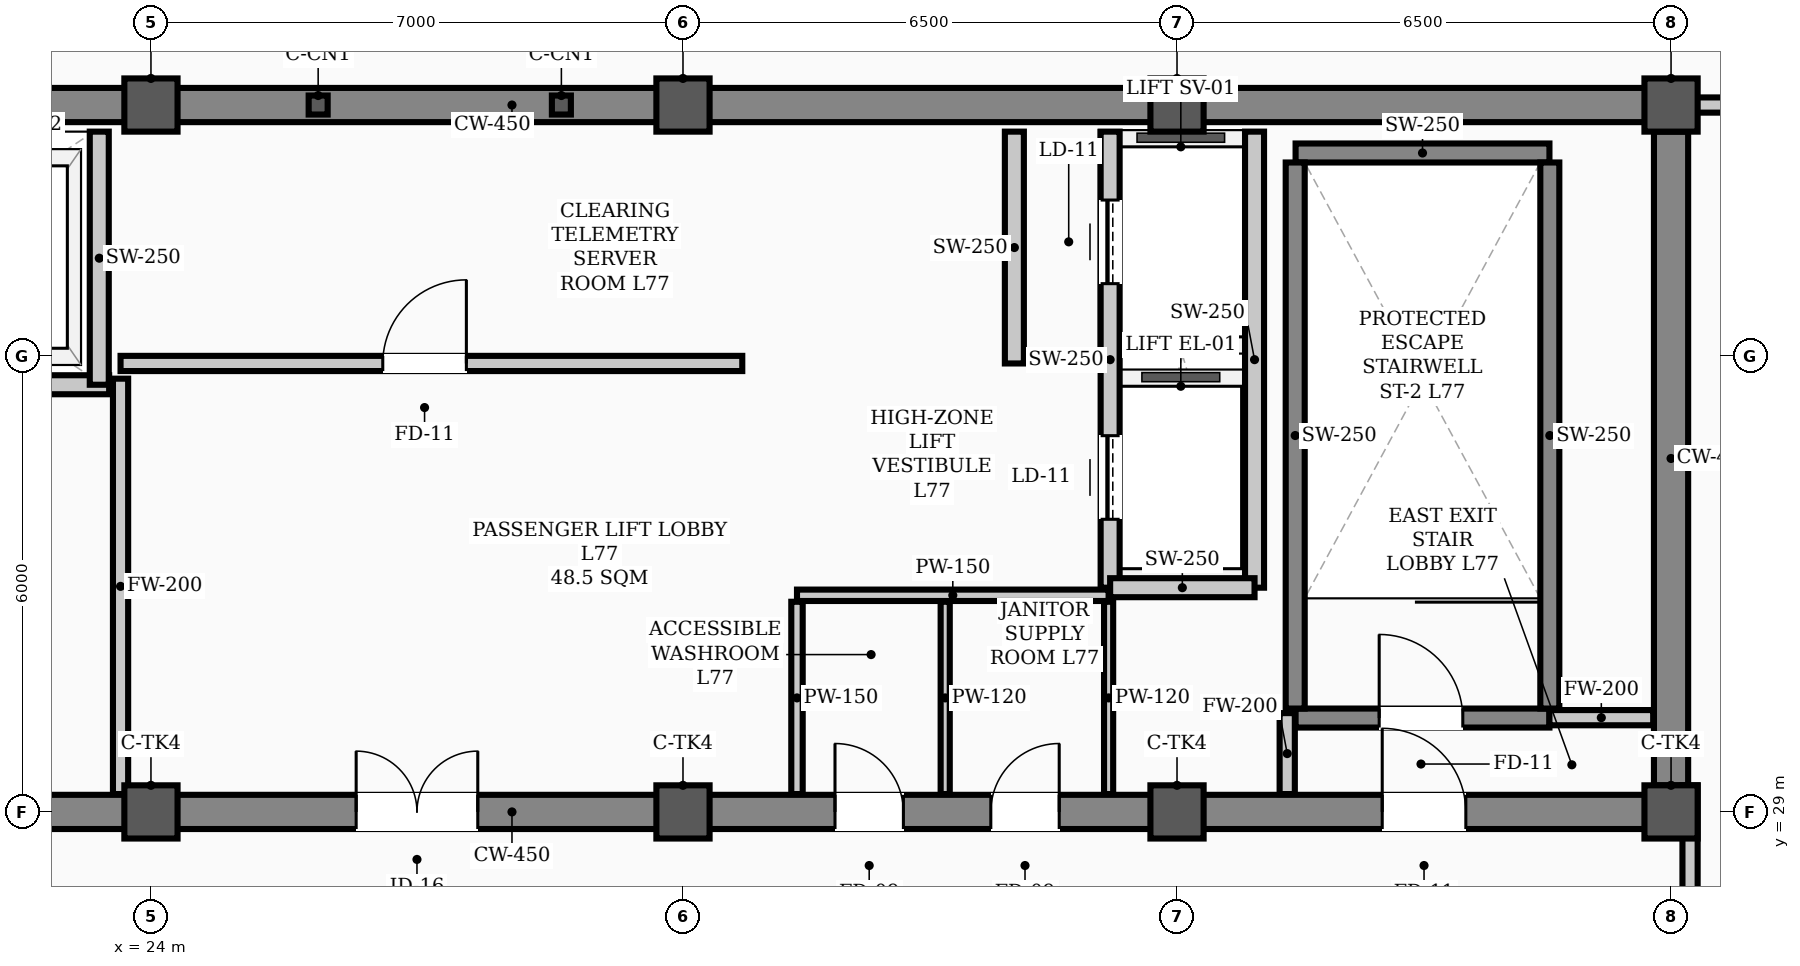
"""IFC4 building model, lengths in metres.
Left out: names, types, materials, properties, quantities, classifications, styles, units other than length and angle.
Written with IfcOpenShell. Run it as: python <this file> out.ifc"""

import sys

from ifc_helpers import new_model, si_unit, direction, frame, frame_2d, origin, origin_2d, place, context, subcontext, project, spatial, rectangle, hollow_rectangle, extrude, element, fill, save


model = new_model("IFC4")
c1 = context("Model", 3, precision=1e-05, world=origin(), true_north=direction((0.0, 1.0)))
c2 = subcontext(c1, "Body", "Model", "MODEL_VIEW")
j1 = project(units=[si_unit("LENGTHUNIT", "METRE"), si_unit("PLANEANGLEUNIT", "RADIAN")], contexts=[c1])
p1 = place(None, origin())
s1 = spatial("IfcSite", under=j1, at=p1, CompositionType="ELEMENT")
p2 = place(p1, origin())
s2 = spatial("IfcBuilding", under=s1, at=p2, CompositionType="ELEMENT")
p3 = place(p2, frame((0.0, 0.0, 312.6)))
s3 = spatial("IfcBuildingStorey", under=s2, at=p3, CompositionType="ELEMENT", Elevation=312.6)
for number, where, z_axis, x_axis in (
    (1, (24.0, 29.0, 0.0), (0.0, 0.0, 1.0), (1.0, 0.0, 0.0)),
    (2, (24.0, 38.3, 0.0), (0.0, 0.0, 1.0), (1.0, 0.0, 0.0)),
    (3, (31.0, 29.0, 0.0), (0.0, 0.0, 1.0), (1.0, 0.0, 0.0)),
    (4, (31.0, 38.3, 0.0), (0.0, 0.0, 1.0), (1.0, 0.0, 0.0)),
    (5, (37.5, 29.0, 0.0), (0.0, 0.0, 1.0), (1.0, 0.0, 0.0)),
    (6, (37.5, 38.3, 0.0), (0.0, 0.0, 1.0), (1.0, 0.0, 0.0)),
    (7, (44.0, 29.0, 0.0), (0.0, 0.0, 1.0), (1.0, 0.0, 0.0)),
    (8, (44.0, 38.3, 0.0), (0.0, 0.0, 1.0), (1.0, 0.0, 0.0)),
):
    element("IfcColumn", number, at=place(p3, frame(where, z_axis=z_axis, x_axis=x_axis)), inside=s3, PredefinedType="COLUMN", context=c2, shape_type="SweptSolid", body=[
        extrude(hollow_rectangle(XDim=0.7, YDim=0.7, WallThickness=0.028, InnerFilletRadius=0.014, OuterFilletRadius=0.042, at=origin_2d()), origin(), (0.0, 0.0, 1.0), 4.8),
    ])
for number, where, z_axis, x_axis in (
    (9, (26.2, 38.3, 0.0), (0.0, 0.0, 1.0), (1.0, 0.0, 0.0)),
    (10, (29.4, 38.3, 0.0), (0.0, 0.0, 1.0), (1.0, 0.0, 0.0)),
):
    element("IfcColumn", number, at=place(p3, frame(where, z_axis=z_axis, x_axis=x_axis)), inside=s3, PredefinedType="COLUMN", context=c2, shape_type="SweptSolid", body=[
        extrude(hollow_rectangle(XDim=0.25, YDim=0.25, WallThickness=0.01, InnerFilletRadius=0.01, OuterFilletRadius=0.02, at=origin_2d()), origin(), (0.0, 0.0, 1.0), 3.1),
    ])
p4 = place(p3, frame((13.5, 29.0, 0.0), z_axis=(0.0, 0.0, 1.0), x_axis=(1.0, 0.0, 0.0)))
e11 = element("IfcWall", 11, at=p4, inside=s3, PredefinedType="SHEAR", context=c2, shape_type="SweptSolid", body=[
    extrude(rectangle(XDim=30.5, YDim=0.45, at=frame_2d((15.25, 0.0))), origin(), (0.0, 0.0, 1.0), 4.45),
])
p5 = place(p4, frame((1.75, 0.0, 0.0)))
e12 = element("IfcOpeningElement", 12, at=p5, cuts=e11, PredefinedType="OPENING", context=c2, shape_type="SweptSolid", body=[
    extrude(rectangle(XDim=1.1, YDim=2.08, at=frame_2d((0.55, 1.04))), frame((0.0, 0.235, 0.0), z_axis=(0.0, -1.0, 0.0), x_axis=(1.0, 0.0, 0.0)), (0.0, 0.0, 1.0), 0.47),
])
p6 = place(p4, frame((26.7, 0.0, 0.0)))
e13 = element("IfcOpeningElement", 13, at=p6, cuts=e11, PredefinedType="OPENING", context=c2, shape_type="SweptSolid", body=[
    extrude(rectangle(XDim=1.1, YDim=2.08, at=frame_2d((0.55, 1.04))), frame((0.0, 0.235, 0.0), z_axis=(0.0, -1.0, 0.0), x_axis=(1.0, 0.0, 0.0)), (0.0, 0.0, 1.0), 0.47),
])
p7 = place(p4, frame((6.8, 0.0, 0.0)))
e14 = element("IfcOpeningElement", 14, at=p7, cuts=e11, PredefinedType="OPENING", context=c2, shape_type="SweptSolid", body=[
    extrude(rectangle(XDim=1.1, YDim=2.08, at=frame_2d((0.55, 1.04))), frame((0.0, 0.235, 0.0), z_axis=(0.0, -1.0, 0.0), x_axis=(1.0, 0.0, 0.0)), (0.0, 0.0, 1.0), 0.47),
])
p8 = place(p4, frame((13.2, 0.0, 0.0)))
e15 = element("IfcOpeningElement", 15, at=p8, cuts=e11, PredefinedType="OPENING", context=c2, shape_type="SweptSolid", body=[
    extrude(rectangle(XDim=1.6, YDim=2.08, at=frame_2d((0.8, 1.04))), frame((0.0, 0.235, 0.0), z_axis=(0.0, -1.0, 0.0), x_axis=(1.0, 0.0, 0.0)), (0.0, 0.0, 1.0), 0.47),
])
p9 = place(p4, frame((19.5, 0.0, 0.0)))
e16 = element("IfcOpeningElement", 16, at=p9, cuts=e11, PredefinedType="OPENING", context=c2, shape_type="SweptSolid", body=[
    extrude(rectangle(XDim=0.9, YDim=2.08, at=frame_2d((0.45, 1.04))), frame((0.0, 0.235, 0.0), z_axis=(0.0, -1.0, 0.0), x_axis=(1.0, 0.0, 0.0)), (0.0, 0.0, 1.0), 0.47),
])
p10 = place(p4, frame((21.55, 0.0, 0.0)))
e17 = element("IfcOpeningElement", 17, at=p10, cuts=e11, PredefinedType="OPENING", context=c2, shape_type="SweptSolid", body=[
    extrude(rectangle(XDim=0.9, YDim=2.08, at=frame_2d((0.45, 1.04))), frame((0.0, 0.235, 0.0), z_axis=(0.0, -1.0, 0.0), x_axis=(1.0, 0.0, 0.0)), (0.0, 0.0, 1.0), 0.47),
])
p11 = place(p3, frame((13.5, 38.3, 0.0), z_axis=(0.0, 0.0, 1.0), x_axis=(1.0, 0.0, 0.0)))
e18 = element("IfcWall", 18, at=p11, inside=s3, PredefinedType="SHEAR", context=c2, shape_type="SweptSolid", body=[
    extrude(rectangle(XDim=30.5, YDim=0.45, at=frame_2d((15.25, 0.0))), origin(), (0.0, 0.0, 1.0), 4.45),
])
p12 = place(p3, frame((44.0, 29.35, 0.0), z_axis=(0.0, 0.0, 1.0), x_axis=(0.0, 1.0, 0.0)))
e19 = element("IfcWall", 19, at=p12, inside=s3, PredefinedType="SHEAR", context=c2, shape_type="SweptSolid", body=[
    extrude(rectangle(XDim=8.6, YDim=0.45, at=frame_2d((4.3, 0.0))), origin(), (0.0, 0.0, 1.0), 4.45),
])
p13 = place(p3, frame((39.06, 30.235, 0.0), z_axis=(0.0, 0.0, 1.0), x_axis=(1.0, 0.0, 0.0)))
e20 = element("IfcWall", 20, at=p13, inside=s3, PredefinedType="STANDARD", context=c2, shape_type="SweptSolid", body=[
    extrude(rectangle(XDim=3.34, YDim=0.25, at=frame_2d((1.67, 0.0))), origin(), (0.0, 0.0, 1.0), 4.45),
])
p14 = place(p13, frame((1.1, 0.0, 0.0)))
e21 = element("IfcOpeningElement", 21, at=p14, cuts=e20, PredefinedType="OPENING", context=c2, shape_type="SweptSolid", body=[
    extrude(rectangle(XDim=1.1, YDim=2.08, at=frame_2d((0.55, 1.04))), frame((0.0, 0.135, 0.0), z_axis=(0.0, -1.0, 0.0), x_axis=(1.0, 0.0, 0.0)), (0.0, 0.0, 1.0), 0.27),
])
p15 = place(p3, frame((39.06, 37.669, 0.0), z_axis=(0.0, 0.0, 1.0), x_axis=(1.0, 0.0, 0.0)))
e22 = element("IfcWall", 22, at=p15, inside=s3, PredefinedType="STANDARD", context=c2, shape_type="SweptSolid", body=[
    extrude(rectangle(XDim=3.34, YDim=0.25, at=frame_2d((1.67, 0.0))), origin(), (0.0, 0.0, 1.0), 4.45),
])
for number, where, z_axis, x_axis in (
    (23, (39.055, 30.36, 0.0), (0.0, 0.0, 1.0), (0.0, 1.0, 0.0)),
    (24, (42.405, 30.36, 0.0), (0.0, 0.0, 1.0), (0.0, 1.0, 0.0)),
):
    element("IfcWall", number, at=place(p3, frame(where, z_axis=z_axis, x_axis=x_axis)), inside=s3, PredefinedType="STANDARD", context=c2, shape_type="SweptSolid", body=[
        extrude(rectangle(XDim=7.184, YDim=0.25, at=frame_2d((3.592, 0.0))), origin(), (0.0, 0.0, 1.0), 4.45),
    ])
p16 = place(p3, frame((18.1, 34.62, 0.0), z_axis=(0.0, 0.0, 1.0), x_axis=(1.0, 0.0, 0.0)))
e25 = element("IfcWall", 25, at=p16, inside=s3, PredefinedType="STANDARD", context=c2, shape_type="SweptSolid", body=[
    extrude(rectangle(XDim=5.35, YDim=0.25, at=frame_2d((2.675, 0.0))), origin(), (0.0, 0.0, 1.0), 4.45),
])
p17 = place(p16, frame((0.85, 0.0, 0.0)))
e26 = element("IfcOpeningElement", 26, at=p17, cuts=e25, PredefinedType="OPENING", context=c2, shape_type="SweptSolid", body=[
    extrude(rectangle(XDim=1.1, YDim=2.08, at=frame_2d((0.55, 1.04))), frame((0.0, 0.135, 0.0), z_axis=(0.0, -1.0, 0.0), x_axis=(1.0, 0.0, 0.0)), (0.0, 0.0, 1.0), 0.27),
])
p18 = place(p16, frame((3.45, 0.0, 0.0)))
e27 = element("IfcOpeningElement", 27, at=p18, cuts=e25, PredefinedType="OPENING", context=c2, shape_type="SweptSolid", body=[
    extrude(rectangle(XDim=1.1, YDim=2.08, at=frame_2d((0.55, 1.04))), frame((0.0, 0.135, 0.0), z_axis=(0.0, -1.0, 0.0), x_axis=(1.0, 0.0, 0.0)), (0.0, 0.0, 1.0), 0.27),
])
p19 = place(p3, frame((36.62, 31.95, 0.0), z_axis=(0.0, 0.0, 1.0), x_axis=(0.0, 1.0, 0.0)))
e28 = element("IfcWall", 28, at=p19, inside=s3, PredefinedType="STANDARD", context=c2, shape_type="SweptSolid", body=[
    extrude(rectangle(XDim=6.0, YDim=0.25, at=frame_2d((3.0, 0.0))), origin(), (0.0, 0.0, 1.0), 4.45),
])
p20 = place(p19, frame((0.9, 0.0, 0.0)))
e29 = element("IfcOpeningElement", 29, at=p20, cuts=e28, PredefinedType="OPENING", context=c2, shape_type="SweptSolid", body=[
    extrude(rectangle(XDim=1.1, YDim=2.08, at=frame_2d((0.55, 1.04))), frame((0.0, 0.135, 0.0), z_axis=(0.0, -1.0, 0.0), x_axis=(1.0, 0.0, 0.0)), (0.0, 0.0, 1.0), 0.27),
])
p21 = place(p19, frame((4.0, 0.0, 0.0)))
e30 = element("IfcOpeningElement", 30, at=p21, cuts=e28, PredefinedType="OPENING", context=c2, shape_type="SweptSolid", body=[
    extrude(rectangle(XDim=1.1, YDim=2.08, at=frame_2d((0.55, 1.04))), frame((0.0, 0.135, 0.0), z_axis=(0.0, -1.0, 0.0), x_axis=(1.0, 0.0, 0.0)), (0.0, 0.0, 1.0), 0.27),
])
p22 = place(p3, frame((38.52, 31.95, 0.0), z_axis=(0.0, 0.0, 1.0), x_axis=(0.0, 1.0, 0.0)))
e31 = element("IfcWall", 31, at=p22, inside=s3, PredefinedType="STANDARD", context=c2, shape_type="SweptSolid", body=[
    extrude(rectangle(XDim=6.0, YDim=0.25, at=frame_2d((3.0, 0.0))), origin(), (0.0, 0.0, 1.0), 4.45),
])
p23 = place(p3, frame((36.62, 31.95, 0.0), z_axis=(0.0, 0.0, 1.0), x_axis=(1.0, 0.0, 0.0)))
e32 = element("IfcWall", 32, at=p23, inside=s3, PredefinedType="STANDARD", context=c2, shape_type="SweptSolid", body=[
    extrude(rectangle(XDim=1.9, YDim=0.25, at=frame_2d((0.95, 0.0))), origin(), (0.0, 0.0, 1.0), 4.45),
])
p24 = place(p3, frame((23.32, 34.62, 0.0), z_axis=(0.0, 0.0, 1.0), x_axis=(0.0, 1.0, 0.0)))
e33 = element("IfcWall", 33, at=p24, inside=s3, PredefinedType="STANDARD", context=c2, shape_type="SweptSolid", body=[
    extrude(rectangle(XDim=3.33, YDim=0.25, at=frame_2d((1.665, 0.0))), origin(), (0.0, 0.0, 1.0), 4.45),
])
p25 = place(p3, frame((35.36, 34.9, 0.0), z_axis=(0.0, 0.0, 1.0), x_axis=(0.0, 1.0, 0.0)))
e34 = element("IfcWall", 34, at=p25, inside=s3, PredefinedType="STANDARD", context=c2, shape_type="SweptSolid", body=[
    extrude(rectangle(XDim=3.05, YDim=0.25, at=frame_2d((1.525, 0.0))), origin(), (0.0, 0.0, 1.0), 4.45),
])
p26 = place(p3, frame((42.4, 30.24, 0.0), z_axis=(0.0, 0.0, 1.0), x_axis=(1.0, 0.0, 0.0)))
e35 = element("IfcWall", 35, at=p26, inside=s3, PredefinedType="STANDARD", context=c2, shape_type="SweptSolid", body=[
    extrude(rectangle(XDim=1.365, YDim=0.2, at=frame_2d((0.683, 0.0))), origin(), (0.0, 0.0, 1.0), 4.45),
])
p27 = place(p3, frame((23.6, 34.9, 0.0), z_axis=(0.0, 0.0, 1.0), x_axis=(1.0, 0.0, 0.0)))
e36 = element("IfcWall", 36, at=p27, inside=s3, PredefinedType="STANDARD", context=c2, shape_type="SweptSolid", body=[
    extrude(rectangle(XDim=8.18, YDim=0.2, at=frame_2d((4.09, 0.0))), origin(), (0.0, 0.0, 1.0), 4.45),
])
p28 = place(p27, frame((3.45, 0.0, 0.0)))
e37 = element("IfcOpeningElement", 37, at=p28, cuts=e36, PredefinedType="OPENING", context=c2, shape_type="SweptSolid", body=[
    extrude(rectangle(XDim=1.1, YDim=2.08, at=frame_2d((0.55, 1.04))), frame((0.0, 0.11, 0.0), z_axis=(0.0, -1.0, 0.0), x_axis=(1.0, 0.0, 0.0)), (0.0, 0.0, 1.0), 0.22),
])
p29 = place(p3, frame((32.5, 31.85, 0.0), z_axis=(0.0, 0.0, 1.0), x_axis=(1.0, 0.0, 0.0)))
e38 = element("IfcWall", 38, at=p29, inside=s3, PredefinedType="PARTITIONING", context=c2, shape_type="SweptSolid", body=[
    extrude(rectangle(XDim=4.1, YDim=0.15, at=frame_2d((2.05, 0.0))), origin(), (0.0, 0.0, 1.0), 4.45),
])
p30 = place(p3, frame((44.0, 38.3, 0.0), z_axis=(0.0, 0.0, 1.0), x_axis=(1.0, 0.0, 0.0)))
e39 = element("IfcWall", 39, at=p30, inside=s3, PredefinedType="STANDARD", context=c2, shape_type="SweptSolid", body=[
    extrude(rectangle(XDim=6.69, YDim=0.2, at=frame_2d((3.345, 0.0))), origin(), (0.0, 0.0, 1.0), 4.45),
])
p31 = place(p3, frame((38.95, 29.235, 0.0), z_axis=(0.0, 0.0, 1.0), x_axis=(0.0, 1.0, 0.0)))
e40 = element("IfcWall", 40, at=p31, inside=s3, PredefinedType="STANDARD", context=c2, shape_type="SweptSolid", body=[
    extrude(rectangle(XDim=1.065, YDim=0.2, at=frame_2d((0.532, 0.0))), origin(), (0.0, 0.0, 1.0), 4.45),
])
p32 = place(p3, frame((23.6, 29.235, 0.0), z_axis=(0.0, 0.0, 1.0), x_axis=(0.0, 1.0, 0.0)))
e41 = element("IfcWall", 41, at=p32, inside=s3, PredefinedType="STANDARD", context=c2, shape_type="SweptSolid", body=[
    extrude(rectangle(XDim=5.465, YDim=0.2, at=frame_2d((2.732, 0.0))), origin(), (0.0, 0.0, 1.0), 4.396),
])
p33 = place(p3, frame((32.5, 29.235, 0.0), z_axis=(0.0, 0.0, 1.0), x_axis=(0.0, 1.0, 0.0)))
e42 = element("IfcWall", 42, at=p33, inside=s3, PredefinedType="PARTITIONING", context=c2, shape_type="SweptSolid", body=[
    extrude(rectangle(XDim=2.53, YDim=0.15, at=frame_2d((1.265, 0.0))), origin(), (0.0, 0.0, 1.0), 4.45),
])
for number, where, z_axis, x_axis in (
    (43, (36.6, 29.235, 0.0), (0.0, 0.0, 1.0), (0.0, 1.0, 0.0)),
    (44, (34.45, 29.235, 0.0), (0.0, 0.0, 1.0), (0.0, 1.0, 0.0)),
):
    element("IfcWall", number, at=place(p3, frame(where, z_axis=z_axis, x_axis=x_axis)), inside=s3, PredefinedType="PARTITIONING", context=c2, shape_type="SweptSolid", body=[
        extrude(rectangle(XDim=2.53, YDim=0.12, at=frame_2d((1.265, 0.0))), origin(), (0.0, 0.0, 1.0), 4.45),
    ])
p34 = place(p3, frame((44.25, 26.11, 0.0), z_axis=(0.0, 0.0, 1.0), x_axis=(0.0, 1.0, 0.0)))
e45 = element("IfcWall", 45, at=p34, inside=s3, PredefinedType="STANDARD", context=c2, shape_type="SweptSolid", body=[
    extrude(rectangle(XDim=3.24, YDim=0.2, at=frame_2d((1.62, 0.0))), origin(), (0.0, 0.0, 1.0), 4.396),
])
p35 = place(p34, frame((0.79, 0.0, 0.0)))
e46 = element("IfcOpeningElement", 46, at=p35, cuts=e45, PredefinedType="OPENING", context=c2, shape_type="SweptSolid", body=[
    extrude(rectangle(XDim=1.1, YDim=2.08, at=frame_2d((0.55, 1.04))), frame((0.0, 0.11, 0.0), z_axis=(0.0, -1.0, 0.0), x_axis=(1.0, 0.0, 0.0)), (0.0, 0.0, 1.0), 0.22),
])
p36 = place(p14, origin())
e47 = element("IfcDoor", 47, at=p36, inside=s3, OperationType="SINGLE_SWING_LEFT", PredefinedType="DOOR", context=c2, shape_type="SweptSolid", body=[
    extrude(rectangle(XDim=1.1, YDim=2.08, at=frame_2d((0.55, 1.04))), frame((0.0, 0.025, 0.0), z_axis=(0.0, -1.0, 0.0), x_axis=(1.0, 0.0, 0.0)), (0.0, 0.0, 1.0), 0.05),
])
fill(e21, e47)
p37 = place(p6, origin())
e48 = element("IfcDoor", 48, at=p37, inside=s3, OperationType="SINGLE_SWING_LEFT", PredefinedType="DOOR", context=c2, shape_type="SweptSolid", body=[
    extrude(rectangle(XDim=1.1, YDim=2.08, at=frame_2d((0.55, 1.04))), frame((0.0, 0.025, 0.0), z_axis=(0.0, -1.0, 0.0), x_axis=(1.0, 0.0, 0.0)), (0.0, 0.0, 1.0), 0.05),
])
fill(e13, e48)
p38 = place(p8, origin())
e49 = element("IfcDoor", 49, at=p38, inside=s3, OperationType="DOUBLE_DOOR_SINGLE_SWING", PredefinedType="DOOR", context=c2, shape_type="SweptSolid", body=[
    extrude(rectangle(XDim=1.6, YDim=2.08, at=frame_2d((0.8, 1.04))), frame((0.0, 0.025, 0.0), z_axis=(0.0, -1.0, 0.0), x_axis=(1.0, 0.0, 0.0)), (0.0, 0.0, 1.0), 0.05),
])
fill(e15, e49)
p39 = place(p28, origin())
e50 = element("IfcDoor", 50, at=p39, inside=s3, OperationType="SINGLE_SWING_RIGHT", PredefinedType="DOOR", context=c2, shape_type="SweptSolid", body=[
    extrude(rectangle(XDim=1.1, YDim=2.08, at=frame_2d((0.55, 1.04))), frame((0.0, 0.025, 0.0), z_axis=(0.0, -1.0, 0.0), x_axis=(1.0, 0.0, 0.0)), (0.0, 0.0, 1.0), 0.05),
])
fill(e37, e50)
p40 = place(p9, origin())
e51 = element("IfcDoor", 51, at=p40, inside=s3, OperationType="SINGLE_SWING_LEFT", PredefinedType="DOOR", context=c2, shape_type="SweptSolid", body=[
    extrude(rectangle(XDim=0.9, YDim=2.08, at=frame_2d((0.45, 1.04))), frame((0.0, 0.025, 0.0), z_axis=(0.0, -1.0, 0.0), x_axis=(1.0, 0.0, 0.0)), (0.0, 0.0, 1.0), 0.05),
])
fill(e16, e51)
p41 = place(p10, origin())
e52 = element("IfcDoor", 52, at=p41, inside=s3, OperationType="SINGLE_SWING_RIGHT", PredefinedType="DOOR", context=c2, shape_type="SweptSolid", body=[
    extrude(rectangle(XDim=0.9, YDim=2.08, at=frame_2d((0.45, 1.04))), frame((0.0, 0.025, 0.0), z_axis=(0.0, -1.0, 0.0), x_axis=(1.0, 0.0, 0.0)), (0.0, 0.0, 1.0), 0.05),
])
fill(e17, e52)
p42 = place(p20, origin())
e53 = element("IfcDoor", 53, at=p42, inside=s3, OperationType="SLIDING_TO_LEFT", PredefinedType="DOOR", context=c2, shape_type="SweptSolid", body=[
    extrude(rectangle(XDim=1.1, YDim=2.08, at=frame_2d((0.55, 1.04))), frame((0.0, 0.025, 0.0), z_axis=(0.0, -1.0, 0.0), x_axis=(1.0, 0.0, 0.0)), (0.0, 0.0, 1.0), 0.05),
])
fill(e29, e53)
p43 = place(p21, origin())
e54 = element("IfcDoor", 54, at=p43, inside=s3, OperationType="SLIDING_TO_LEFT", PredefinedType="DOOR", context=c2, shape_type="SweptSolid", body=[
    extrude(rectangle(XDim=1.1, YDim=2.08, at=frame_2d((0.55, 1.04))), frame((0.0, 0.025, 0.0), z_axis=(0.0, -1.0, 0.0), x_axis=(1.0, 0.0, 0.0)), (0.0, 0.0, 1.0), 0.05),
])
fill(e30, e54)
save(model, sys.argv[1])
